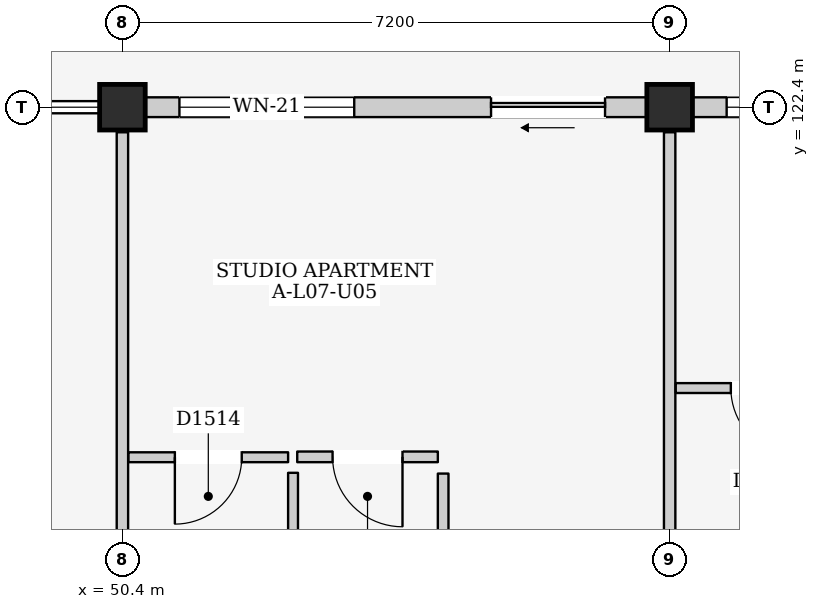
"""IFC4 building model, lengths in metres.
Left out: names, types, materials, properties, quantities, classifications, styles, units other than length and angle.
Written with IfcOpenShell. Run it as: python <this file> out.ifc"""

import sys

from ifc_helpers import new_model, si_unit, direction, frame, frame_2d, origin, origin_2d, place, context, subcontext, project, spatial, rectangle, extrude, element, fill, save


model = new_model("IFC4")
c1 = context("Model", 3, precision=1e-05, world=origin(), true_north=direction((0.0, 1.0)))
c2 = subcontext(c1, "Body", "Model", "MODEL_VIEW")
j1 = project(units=[si_unit("LENGTHUNIT", "METRE"), si_unit("PLANEANGLEUNIT", "RADIAN")], contexts=[c1])
p1 = place(None, origin())
s1 = spatial("IfcSite", under=j1, at=p1, CompositionType="ELEMENT")
p2 = place(p1, origin())
s2 = spatial("IfcBuilding", under=s1, at=p2, CompositionType="ELEMENT")
p3 = place(p2, frame((0.0, 0.0, 25.1)))
s3 = spatial("IfcBuildingStorey", under=s2, at=p3, CompositionType="ELEMENT", Elevation=25.1)
for number, where, z_axis, x_axis in (
    (1, (50.4, 122.4, 0.0), (0.0, 0.0, 1.0), (1.0, 0.0, 0.0)),
    (2, (57.6, 122.4, 0.0), (0.0, 0.0, 1.0), (1.0, 0.0, 0.0)),
):
    element("IfcColumn", number, at=place(p3, frame(where, z_axis=z_axis, x_axis=x_axis)), inside=s3, PredefinedType="COLUMN", context=c2, shape_type="SweptSolid", body=[
        extrude(rectangle(XDim=0.6, YDim=0.6, at=origin_2d()), origin(), (0.0, 0.0, 1.0), 3.2),
    ])
p4 = place(p3, frame((50.7, 122.4, 0.0), z_axis=(0.0, 0.0, 1.0), x_axis=(1.0, 0.0, 0.0)))
e3 = element("IfcWall", 3, at=p4, inside=s3, PredefinedType="ELEMENTEDWALL", context=c2, shape_type="SweptSolid", body=[
    extrude(rectangle(XDim=6.6, YDim=0.26, at=frame_2d((3.3, 0.0))), origin(), (0.0, 0.0, 1.0), 2.525),
])
p5 = place(p4, frame((4.55, 0.0, 0.0)))
e4 = element("IfcOpeningElement", 4, at=p5, cuts=e3, PredefinedType="OPENING", context=c2, shape_type="SweptSolid", body=[
    extrude(rectangle(XDim=1.5, YDim=2.12, at=frame_2d((0.75, 1.06))), frame((0.0, 0.145, 0.0), z_axis=(0.0, -1.0, 0.0), x_axis=(1.0, 0.0, 0.0)), (0.0, 0.0, 1.0), 0.29),
])
p6 = place(p4, frame((0.45, 0.0, 0.815)))
e5 = element("IfcOpeningElement", 5, at=p6, cuts=e3, PredefinedType="OPENING", context=c2, shape_type="SweptSolid", body=[
    extrude(rectangle(XDim=2.3, YDim=1.6, at=frame_2d((1.15, 0.8))), frame((0.0, 0.145, 0.0), z_axis=(0.0, -1.0, 0.0), x_axis=(1.0, 0.0, 0.0)), (0.0, 0.0, 1.0), 0.29),
])
p7 = place(p3, frame((57.9, 122.4, 0.0), z_axis=(0.0, 0.0, 1.0), x_axis=(1.0, 0.0, 0.0)))
e6 = element("IfcWall", 6, at=p7, inside=s3, PredefinedType="ELEMENTEDWALL", context=c2, shape_type="SweptSolid", body=[
    extrude(rectangle(XDim=6.6, YDim=0.26, at=frame_2d((3.3, 0.0))), origin(), (0.0, 0.0, 1.0), 2.525),
])
p8 = place(p7, frame((3.65, 0.0, 0.0)))
e7 = element("IfcOpeningElement", 7, at=p8, cuts=e6, PredefinedType="OPENING", context=c2, shape_type="SweptSolid", body=[
    extrude(rectangle(XDim=2.4, YDim=2.12, at=frame_2d((1.2, 1.06))), frame((0.0, 0.145, 0.0), z_axis=(0.0, -1.0, 0.0), x_axis=(1.0, 0.0, 0.0)), (0.0, 0.0, 1.0), 0.29),
])
p9 = place(p7, frame((0.45, 0.0, 0.9)))
e8 = element("IfcOpeningElement", 8, at=p9, cuts=e6, PredefinedType="OPENING", context=c2, shape_type="SweptSolid", body=[
    extrude(rectangle(XDim=1.55, YDim=1.45, at=frame_2d((0.775, 0.725))), frame((0.0, 0.145, 0.0), z_axis=(0.0, -1.0, 0.0), x_axis=(1.0, 0.0, 0.0)), (0.0, 0.0, 1.0), 0.29),
])
for number, where, z_axis, x_axis in (
    (9, (50.4, 115.53, 0.0), (0.0, 0.0, 1.0), (0.0, 1.0, 0.0)),
    (10, (57.6, 115.53, 0.0), (0.0, 0.0, 1.0), (0.0, 1.0, 0.0)),
):
    element("IfcWall", number, at=place(p3, frame(where, z_axis=z_axis, x_axis=x_axis)), inside=s3, PredefinedType="PARTITIONING", context=c2, shape_type="SweptSolid", body=[
        extrude(rectangle(XDim=6.54, YDim=0.15, at=frame_2d((3.27, 0.0))), origin(), (0.0, 0.0, 1.0), 2.475),
    ])
p10 = place(p3, frame((50.48, 117.795, 0.0), z_axis=(0.0, 0.0, 1.0), x_axis=(1.0, 0.0, 0.0)))
e11 = element("IfcWall", 11, at=p10, inside=s3, PredefinedType="PARTITIONING", context=c2, shape_type="SweptSolid", body=[
    extrude(rectangle(XDim=2.1, YDim=0.13, at=frame_2d((1.05, 0.0))), origin(), (0.0, 0.0, 1.0), 2.99),
])
p11 = place(p10, frame((0.61, 0.0, 0.0)))
e12 = element("IfcOpeningElement", 12, at=p11, cuts=e11, PredefinedType="OPENING", context=c2, shape_type="SweptSolid", body=[
    extrude(rectangle(XDim=0.88, YDim=2.1, at=frame_2d((0.44, 1.05))), frame((0.0, 0.08, 0.0), z_axis=(0.0, -1.0, 0.0), x_axis=(1.0, 0.0, 0.0)), (0.0, 0.0, 1.0), 0.16),
])
p12 = place(p3, frame((52.645, 115.46, 0.0), z_axis=(0.0, 0.0, 1.0), x_axis=(0.0, 1.0, 0.0)))
e13 = element("IfcWall", 13, at=p12, inside=s3, PredefinedType="PARTITIONING", context=c2, shape_type="SweptSolid", body=[
    extrude(rectangle(XDim=2.13, YDim=0.13, at=frame_2d((1.065, 0.0))), origin(), (0.0, 0.0, 1.0), 2.99),
])
p13 = place(p3, frame((52.7, 117.8, 0.0), z_axis=(0.0, 0.0, 1.0), x_axis=(1.0, 0.0, 0.0)))
e14 = element("IfcWall", 14, at=p13, inside=s3, PredefinedType="PARTITIONING", context=c2, shape_type="SweptSolid", body=[
    extrude(rectangle(XDim=1.85, YDim=0.14, at=frame_2d((0.925, 0.0))), origin(), (0.0, 0.0, 1.0), 2.99),
])
p14 = place(p13, frame((0.465, 0.0, 0.0)))
e15 = element("IfcOpeningElement", 15, at=p14, cuts=e14, PredefinedType="OPENING", context=c2, shape_type="SweptSolid", body=[
    extrude(rectangle(XDim=0.92, YDim=2.1, at=frame_2d((0.46, 1.05))), frame((0.0, 0.085, 0.0), z_axis=(0.0, -1.0, 0.0), x_axis=(1.0, 0.0, 0.0)), (0.0, 0.0, 1.0), 0.17),
])
p15 = place(p3, frame((54.62, 115.43, 0.0), z_axis=(0.0, 0.0, 1.0), x_axis=(0.0, 1.0, 0.0)))
e16 = element("IfcWall", 16, at=p15, inside=s3, PredefinedType="PARTITIONING", context=c2, shape_type="SweptSolid", body=[
    extrude(rectangle(XDim=2.15, YDim=0.14, at=frame_2d((1.075, 0.0))), origin(), (0.0, 0.0, 1.0), 2.99),
])
p16 = place(p3, frame((57.68, 118.705, 0.0), z_axis=(0.0, 0.0, 1.0), x_axis=(1.0, 0.0, 0.0)))
e17 = element("IfcWall", 17, at=p16, inside=s3, PredefinedType="PARTITIONING", context=c2, shape_type="SweptSolid", body=[
    extrude(rectangle(XDim=2.35, YDim=0.13, at=frame_2d((1.175, 0.0))), origin(), (0.0, 0.0, 1.0), 2.99),
])
p17 = place(p16, frame((0.725, 0.0, 0.0)))
e18 = element("IfcOpeningElement", 18, at=p17, cuts=e17, PredefinedType="OPENING", context=c2, shape_type="SweptSolid", body=[
    extrude(rectangle(XDim=0.9, YDim=2.1, at=frame_2d((0.45, 1.05))), frame((0.0, 0.08, 0.0), z_axis=(0.0, -1.0, 0.0), x_axis=(1.0, 0.0, 0.0)), (0.0, 0.0, 1.0), 0.16),
])
p18 = place(p5, frame((1.5, 0.0, 0.0), z_axis=(0.0, 0.0, 1.0), x_axis=(-1.0, 0.0, 0.0)))
e19 = element("IfcDoor", 19, at=p18, inside=s3, OperationType="SLIDING_TO_LEFT", PredefinedType="DOOR", context=c2, shape_type="SweptSolid", body=[
    extrude(rectangle(XDim=1.5, YDim=2.12, at=frame_2d((0.75, 1.06))), frame((0.0, 0.025, 0.0), z_axis=(0.0, -1.0, 0.0), x_axis=(1.0, 0.0, 0.0)), (0.0, 0.0, 1.0), 0.05),
])
fill(e4, e19)
p19 = place(p6, origin())
e20 = element("IfcWindow", 20, at=p19, inside=s3, PartitioningType="TRIPLE_PANEL_VERTICAL", PredefinedType="WINDOW", context=c2, shape_type="SweptSolid", body=[
    extrude(rectangle(XDim=2.3, YDim=1.6, at=frame_2d((1.15, 0.8))), frame((0.0, 0.03, 0.0), z_axis=(0.0, -1.0, 0.0), x_axis=(1.0, 0.0, 0.0)), (0.0, 0.0, 1.0), 0.06),
])
fill(e5, e20)
p20 = place(p9, origin())
e21 = element("IfcWindow", 21, at=p20, inside=s3, PartitioningType="DOUBLE_PANEL_VERTICAL", PredefinedType="WINDOW", context=c2, shape_type="SweptSolid", body=[
    extrude(rectangle(XDim=1.55, YDim=1.45, at=frame_2d((0.775, 0.725))), frame((0.0, 0.03, 0.0), z_axis=(0.0, -1.0, 0.0), x_axis=(1.0, 0.0, 0.0)), (0.0, 0.0, 1.0), 0.06),
])
fill(e8, e21)
p21 = place(p11, frame((0.88, 0.0, 0.0), z_axis=(0.0, 0.0, 1.0), x_axis=(-1.0, 0.0, 0.0)))
e22 = element("IfcDoor", 22, at=p21, inside=s3, OperationType="SINGLE_SWING_RIGHT", PredefinedType="DOOR", context=c2, shape_type="SweptSolid", body=[
    extrude(rectangle(XDim=0.88, YDim=2.1, at=frame_2d((0.44, 1.05))), frame((0.0, 0.025, 0.0), z_axis=(0.0, -1.0, 0.0), x_axis=(1.0, 0.0, 0.0)), (0.0, 0.0, 1.0), 0.05),
])
fill(e12, e22)
p22 = place(p14, frame((0.92, 0.0, 0.0), z_axis=(0.0, 0.0, 1.0), x_axis=(-1.0, 0.0, 0.0)))
e23 = element("IfcDoor", 23, at=p22, inside=s3, OperationType="SINGLE_SWING_LEFT", PredefinedType="DOOR", context=c2, shape_type="SweptSolid", body=[
    extrude(rectangle(XDim=0.92, YDim=2.1, at=frame_2d((0.46, 1.05))), frame((0.0, 0.025, 0.0), z_axis=(0.0, -1.0, 0.0), x_axis=(1.0, 0.0, 0.0)), (0.0, 0.0, 1.0), 0.05),
])
fill(e15, e23)
p23 = place(p17, frame((0.9, 0.0, 0.0), z_axis=(0.0, 0.0, 1.0), x_axis=(-1.0, 0.0, 0.0)))
e24 = element("IfcDoor", 24, at=p23, inside=s3, OperationType="SINGLE_SWING_LEFT", PredefinedType="DOOR", context=c2, shape_type="SweptSolid", body=[
    extrude(rectangle(XDim=0.9, YDim=2.1, at=frame_2d((0.45, 1.05))), frame((0.0, 0.025, 0.0), z_axis=(0.0, -1.0, 0.0), x_axis=(1.0, 0.0, 0.0)), (0.0, 0.0, 1.0), 0.05),
])
fill(e18, e24)
save(model, sys.argv[1])
